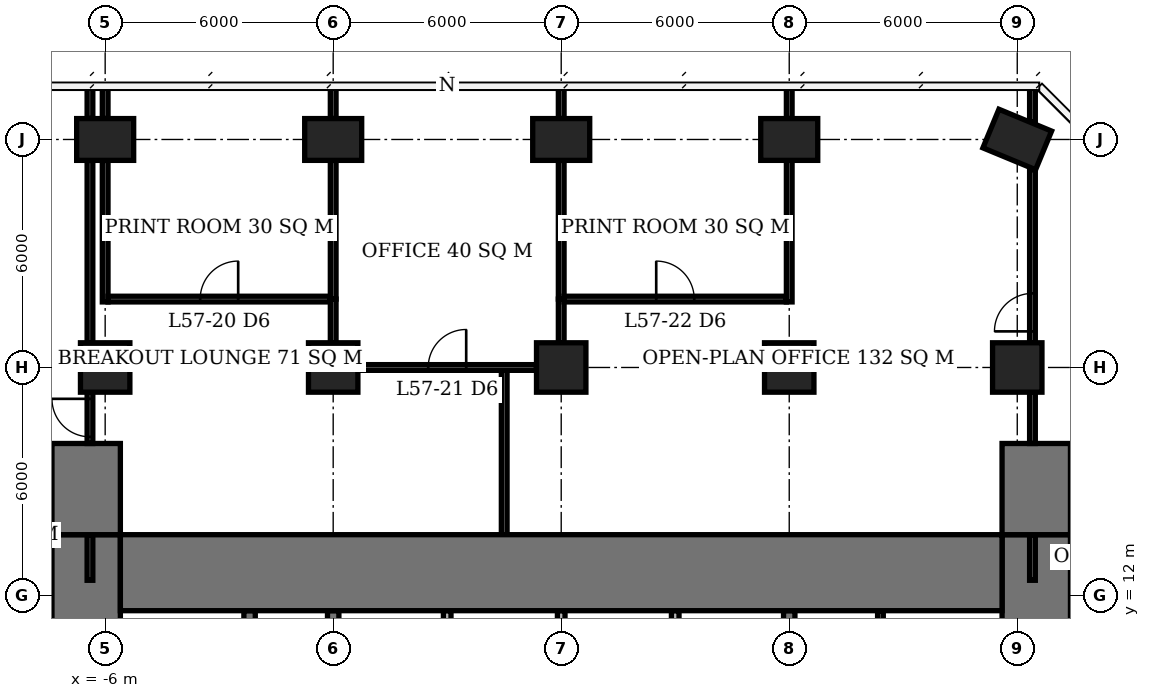
"""IFC4 building model, lengths in metres.
Left out: names, types, materials, properties, quantities, classifications, styles, units other than length and angle.
Written with IfcOpenShell. Run it as: python <this file> out.ifc"""

import sys

from ifc_helpers import new_model, si_unit, direction, frame, frame_2d, origin, origin_2d, place, context, subcontext, project, spatial, rectangle, extrude, element, fill, save


model = new_model("IFC4")
c1 = context("Model", 3, precision=1e-05, world=origin(), true_north=direction((0.0, 1.0)))
c2 = subcontext(c1, "Body", "Model", "MODEL_VIEW")
j1 = project(units=[si_unit("LENGTHUNIT", "METRE"), si_unit("PLANEANGLEUNIT", "RADIAN")], contexts=[c1])
p1 = place(None, origin())
s1 = spatial("IfcSite", under=j1, at=p1, CompositionType="ELEMENT")
p2 = place(p1, origin())
s2 = spatial("IfcBuilding", under=s1, at=p2, CompositionType="ELEMENT")
p3 = place(p2, frame((0.0, 0.0, 231.8)))
s3 = spatial("IfcBuildingStorey", under=s2, at=p3, CompositionType="ELEMENT", Elevation=231.8)
p4 = place(p3, frame((-6.0, 18.0, 0.0), z_axis=(0.0, 0.0, 1.0), x_axis=(1.0, 0.0, 0.0)))
e1 = element("IfcColumn", 1, at=p4, inside=s3, PredefinedType="COLUMN", context=c2, shape_type="SweptSolid", body=[
    extrude(rectangle(XDim=1.3, YDim=1.3, at=origin_2d()), origin(), (0.0, 0.0, 1.0), 3.9),
])
p5 = place(p3, frame((-6.0, 24.0, 0.0), z_axis=(0.0, 0.0, 1.0), x_axis=(1.0, 0.0, 0.0)))
e2 = element("IfcColumn", 2, at=p5, inside=s3, PredefinedType="COLUMN", context=c2, shape_type="SweptSolid", body=[
    extrude(rectangle(XDim=1.5, YDim=1.1, at=origin_2d()), origin(), (0.0, 0.0, 1.0), 3.9),
])
p6 = place(p3, frame((0.0, 18.0, 0.0), z_axis=(0.0, 0.0, 1.0), x_axis=(1.0, 0.0, 0.0)))
e3 = element("IfcColumn", 3, at=p6, inside=s3, PredefinedType="COLUMN", context=c2, shape_type="SweptSolid", body=[
    extrude(rectangle(XDim=1.3, YDim=1.3, at=origin_2d()), origin(), (0.0, 0.0, 1.0), 3.9),
])
p7 = place(p3, frame((0.0, 24.0, 0.0), z_axis=(0.0, 0.0, 1.0), x_axis=(1.0, 0.0, 0.0)))
e4 = element("IfcColumn", 4, at=p7, inside=s3, PredefinedType="COLUMN", context=c2, shape_type="SweptSolid", body=[
    extrude(rectangle(XDim=1.5, YDim=1.1, at=origin_2d()), origin(), (0.0, 0.0, 1.0), 3.9),
])
p8 = place(p3, frame((6.0, 18.0, 0.0), z_axis=(0.0, 0.0, 1.0), x_axis=(1.0, 0.0, 0.0)))
e5 = element("IfcColumn", 5, at=p8, inside=s3, PredefinedType="COLUMN", context=c2, shape_type="SweptSolid", body=[
    extrude(rectangle(XDim=1.3, YDim=1.3, at=origin_2d()), origin(), (0.0, 0.0, 1.0), 3.9),
])
p9 = place(p3, frame((6.0, 24.0, 0.0), z_axis=(0.0, 0.0, 1.0), x_axis=(1.0, 0.0, 0.0)))
e6 = element("IfcColumn", 6, at=p9, inside=s3, PredefinedType="COLUMN", context=c2, shape_type="SweptSolid", body=[
    extrude(rectangle(XDim=1.5, YDim=1.1, at=origin_2d()), origin(), (0.0, 0.0, 1.0), 3.9),
])
p10 = place(p3, frame((12.0, 18.0, 0.0), z_axis=(0.0, 0.0, 1.0), x_axis=(1.0, 0.0, 0.0)))
e7 = element("IfcColumn", 7, at=p10, inside=s3, PredefinedType="COLUMN", context=c2, shape_type="SweptSolid", body=[
    extrude(rectangle(XDim=1.3, YDim=1.3, at=origin_2d()), origin(), (0.0, 0.0, 1.0), 3.9),
])
p11 = place(p3, frame((12.0, 24.0, 0.0), z_axis=(0.0, 0.0, 1.0), x_axis=(1.0, 0.0, 0.0)))
e8 = element("IfcColumn", 8, at=p11, inside=s3, PredefinedType="COLUMN", context=c2, shape_type="SweptSolid", body=[
    extrude(rectangle(XDim=1.5, YDim=1.1, at=origin_2d()), origin(), (0.0, 0.0, 1.0), 3.9),
])
p12 = place(p3, frame((18.0, 18.0, 0.0), z_axis=(0.0, 0.0, 1.0), x_axis=(1.0, 0.0, 0.0)))
e9 = element("IfcColumn", 9, at=p12, inside=s3, PredefinedType="COLUMN", context=c2, shape_type="SweptSolid", body=[
    extrude(rectangle(XDim=1.3, YDim=1.3, at=origin_2d()), origin(), (0.0, 0.0, 1.0), 3.9),
])
p13 = place(p3, frame((18.0, 24.0, 0.0), z_axis=(0.0, 0.0, 1.0), x_axis=(0.923879532511, -0.382683432365, 0.0)))
e10 = element("IfcColumn", 10, at=p13, inside=s3, PredefinedType="COLUMN", context=c2, shape_type="SweptSolid", body=[
    extrude(rectangle(XDim=1.5, YDim=1.1, at=origin_2d()), origin(), (0.0, 0.0, 1.0), 3.9),
])
p14 = place(p3, frame((-5.6, 12.6, 0.0), z_axis=(0.0, 0.0, 1.0), x_axis=(1.0, 0.0, 0.0)))
e11 = element("IfcWall", 11, at=p14, inside=s3, PredefinedType="SHEAR", context=c2, shape_type="SweptSolid", body=[
    extrude(rectangle(XDim=23.2, YDim=2.0, at=frame_2d((11.6, 0.0))), origin(), (0.0, 0.0, 1.0), 3.9),
])
p15 = place(p3, frame((-6.5, -7.6, 0.0), z_axis=(0.0, 0.0, 1.0), x_axis=(0.0, 1.0, 0.0)))
e12 = element("IfcWall", 12, at=p15, inside=s3, PredefinedType="SHEAR", context=c2, shape_type="SweptSolid", body=[
    extrude(rectangle(XDim=21.2, YDim=1.8, at=frame_2d((10.6, 0.0))), origin(), (0.0, 0.0, 1.0), 3.9),
])
p16 = place(p15, frame((7.8, 0.0, 0.0)))
e13 = element("IfcOpeningElement", 13, at=p16, cuts=e12, PredefinedType="OPENING", context=c2, shape_type="SweptSolid", body=[
    extrude(rectangle(XDim=1.8, YDim=2.4, at=frame_2d((0.9, 1.2))), frame((0.0, 0.91, 0.0), z_axis=(0.0, -1.0, 0.0), x_axis=(1.0, 0.0, 0.0)), (0.0, 0.0, 1.0), 1.82),
])
p17 = place(p3, frame((18.5, -7.6, 0.0), z_axis=(0.0, 0.0, 1.0), x_axis=(0.0, 1.0, 0.0)))
e14 = element("IfcWall", 14, at=p17, inside=s3, PredefinedType="SHEAR", context=c2, shape_type="SweptSolid", body=[
    extrude(rectangle(XDim=21.2, YDim=1.8, at=frame_2d((10.6, 0.0))), origin(), (0.0, 0.0, 1.0), 3.9),
])
p18 = place(p17, frame((9.2, 0.0, 0.0)))
e15 = element("IfcOpeningElement", 15, at=p18, cuts=e14, PredefinedType="OPENING", context=c2, shape_type="SweptSolid", body=[
    extrude(rectangle(XDim=1.8, YDim=2.4, at=frame_2d((0.9, 1.2))), frame((0.0, 0.91, 0.0), z_axis=(0.0, -1.0, 0.0), x_axis=(1.0, 0.0, 0.0)), (0.0, 0.0, 1.0), 1.82),
])
for number, where, z_axis, x_axis in (
    (16, (-6.5, 13.6, 0.0), (0.0, 0.0, 1.0), (0.0, 1.0, 0.0)),
    (17, (18.5, 13.6, 0.0), (0.0, 0.0, 1.0), (0.0, 1.0, 0.0)),
):
    element("IfcWall", number, at=place(p3, frame(where, z_axis=z_axis, x_axis=x_axis)), inside=s3, PredefinedType="SHEAR", context=c2, shape_type="SweptSolid", body=[
        extrude(rectangle(XDim=2.4, YDim=1.8, at=frame_2d((1.2, 0.0))), origin(), (0.0, 0.0, 1.0), 3.9),
    ])
p19 = place(p3, frame((0.0, 3.15, 0.0), z_axis=(0.0, 0.0, 1.0), x_axis=(0.0, 1.0, 0.0)))
e18 = element("IfcWall", 18, at=p19, inside=s3, PredefinedType="SHEAR", context=c2, shape_type="SweptSolid", body=[
    extrude(rectangle(XDim=8.45, YDim=0.3, at=frame_2d((4.225, 0.0))), origin(), (0.0, 0.0, 1.0), 3.9),
])
p20 = place(p3, frame((12.0, 6.15, 0.0), z_axis=(0.0, 0.0, 1.0), x_axis=(0.0, 1.0, 0.0)))
e19 = element("IfcWall", 19, at=p20, inside=s3, PredefinedType="SHEAR", context=c2, shape_type="SweptSolid", body=[
    extrude(rectangle(XDim=5.45, YDim=0.3, at=frame_2d((2.725, 0.0))), origin(), (0.0, 0.0, 1.0), 3.9),
])
p21 = place(p3, frame((-2.2, 3.15, 0.0), z_axis=(0.0, 0.0, 1.0), x_axis=(0.0, 1.0, 0.0)))
e20 = element("IfcWall", 20, at=p21, inside=s3, PredefinedType="SHEAR", context=c2, shape_type="SweptSolid", body=[
    extrude(rectangle(XDim=8.45, YDim=0.3, at=frame_2d((4.225, 0.0))), origin(), (0.0, 0.0, 1.0), 3.9),
])
for number, where, z_axis, x_axis in (
    (21, (3.0, 6.15, 0.0), (0.0, 0.0, 1.0), (0.0, 1.0, 0.0)),
    (22, (6.0, 6.15, 0.0), (0.0, 0.0, 1.0), (0.0, 1.0, 0.0)),
    (23, (9.0, 6.15, 0.0), (0.0, 0.0, 1.0), (0.0, 1.0, 0.0)),
):
    element("IfcWall", number, at=place(p3, frame(where, z_axis=z_axis, x_axis=x_axis)), inside=s3, PredefinedType="SOLIDWALL", context=c2, shape_type="SweptSolid", body=[
        extrude(rectangle(XDim=5.45, YDim=0.2, at=frame_2d((2.725, 0.0))), origin(), (0.0, 0.0, 1.0), 3.9),
    ])
p22 = place(p3, frame((14.4, 6.15, 0.0), z_axis=(0.0, 0.0, 1.0), x_axis=(0.0, 1.0, 0.0)))
e24 = element("IfcWall", 24, at=p22, inside=s3, PredefinedType="PLUMBINGWALL", context=c2, shape_type="SweptSolid", body=[
    extrude(rectangle(XDim=5.45, YDim=0.15, at=frame_2d((2.725, 0.0))), origin(), (0.0, 0.0, 1.0), 3.65),
])
p23 = place(p3, frame((0.65, 18.0, 0.0), z_axis=(0.0, 0.0, 1.0), x_axis=(1.0, 0.0, 0.0)))
e25 = element("IfcWall", 25, at=p23, inside=s3, PredefinedType="PARTITIONING", context=c2, shape_type="SweptSolid", body=[
    extrude(rectangle(XDim=4.7, YDim=0.15, at=frame_2d((2.35, 0.0))), origin(), (0.0, 0.0, 1.0), 3.65),
])
p24 = place(p23, frame((1.85, 0.0, 0.0)))
e26 = element("IfcOpeningElement", 26, at=p24, cuts=e25, PredefinedType="OPENING", context=c2, shape_type="SweptSolid", body=[
    extrude(rectangle(XDim=1.0, YDim=2.1, at=frame_2d((0.5, 1.05))), frame((0.0, 0.085, 0.0), z_axis=(0.0, -1.0, 0.0), x_axis=(1.0, 0.0, 0.0)), (0.0, 0.0, 1.0), 0.17),
])
p25 = place(p3, frame((-5.925, 19.8, 0.0), z_axis=(0.0, 0.0, 1.0), x_axis=(1.0, 0.0, 0.0)))
e27 = element("IfcWall", 27, at=p25, inside=s3, PredefinedType="PARTITIONING", context=c2, shape_type="SweptSolid", body=[
    extrude(rectangle(XDim=5.85, YDim=0.15, at=frame_2d((2.925, 0.0))), origin(), (0.0, 0.0, 1.0), 3.65),
])
p26 = place(p25, frame((2.425, 0.0, 0.0)))
e28 = element("IfcOpeningElement", 28, at=p26, cuts=e27, PredefinedType="OPENING", context=c2, shape_type="SweptSolid", body=[
    extrude(rectangle(XDim=1.0, YDim=2.1, at=frame_2d((0.5, 1.05))), frame((0.0, 0.085, 0.0), z_axis=(0.0, -1.0, 0.0), x_axis=(1.0, 0.0, 0.0)), (0.0, 0.0, 1.0), 0.17),
])
p27 = place(p3, frame((6.075, 19.8, 0.0), z_axis=(0.0, 0.0, 1.0), x_axis=(1.0, 0.0, 0.0)))
e29 = element("IfcWall", 29, at=p27, inside=s3, PredefinedType="PARTITIONING", context=c2, shape_type="SweptSolid", body=[
    extrude(rectangle(XDim=5.85, YDim=0.15, at=frame_2d((2.925, 0.0))), origin(), (0.0, 0.0, 1.0), 3.65),
])
p28 = place(p27, frame((2.425, 0.0, 0.0)))
e30 = element("IfcOpeningElement", 30, at=p28, cuts=e29, PredefinedType="OPENING", context=c2, shape_type="SweptSolid", body=[
    extrude(rectangle(XDim=1.0, YDim=2.1, at=frame_2d((0.5, 1.05))), frame((0.0, 0.085, 0.0), z_axis=(0.0, -1.0, 0.0), x_axis=(1.0, 0.0, 0.0)), (0.0, 0.0, 1.0), 0.17),
])
p29 = place(p3, frame((-6.0, 19.725, 0.0), z_axis=(0.0, 0.0, 1.0), x_axis=(0.0, 1.0, 0.0)))
e31 = element("IfcWall", 31, at=p29, inside=s3, PredefinedType="PARTITIONING", context=c2, shape_type="SweptSolid", body=[
    extrude(rectangle(XDim=3.725, YDim=0.15, at=frame_2d((1.862, 0.0))), origin(), (0.0, 0.0, 1.0), 3.65),
])
p30 = place(p3, frame((-6.0, 24.55, 0.0), z_axis=(0.0, 0.0, 1.0), x_axis=(0.0, 1.0, 0.0)))
e32 = element("IfcWall", 32, at=p30, inside=s3, PredefinedType="PARTITIONING", context=c2, shape_type="SweptSolid", body=[
    extrude(rectangle(XDim=0.85, YDim=0.15, at=frame_2d((0.425, 0.0))), origin(), (0.0, 0.0, 1.0), 3.65),
])
p31 = place(p3, frame((0.0, 18.65, 0.0), z_axis=(0.0, 0.0, 1.0), x_axis=(0.0, 1.0, 0.0)))
e33 = element("IfcWall", 33, at=p31, inside=s3, PredefinedType="PARTITIONING", context=c2, shape_type="SweptSolid", body=[
    extrude(rectangle(XDim=1.15, YDim=0.15, at=frame_2d((0.575, 0.0))), origin(), (0.0, 0.0, 1.0), 3.65),
])
p32 = place(p3, frame((0.0, 19.8, 0.0), z_axis=(0.0, 0.0, 1.0), x_axis=(0.0, 1.0, 0.0)))
e34 = element("IfcWall", 34, at=p32, inside=s3, PredefinedType="PARTITIONING", context=c2, shape_type="SweptSolid", body=[
    extrude(rectangle(XDim=3.65, YDim=0.15, at=frame_2d((1.825, 0.0))), origin(), (0.0, 0.0, 1.0), 3.65),
])
p33 = place(p3, frame((0.0, 24.55, 0.0), z_axis=(0.0, 0.0, 1.0), x_axis=(0.0, 1.0, 0.0)))
e35 = element("IfcWall", 35, at=p33, inside=s3, PredefinedType="PARTITIONING", context=c2, shape_type="SweptSolid", body=[
    extrude(rectangle(XDim=0.8, YDim=0.15, at=frame_2d((0.4, 0.0))), origin(), (0.0, 0.0, 1.0), 3.65),
])
p34 = place(p3, frame((6.0, 18.65, 0.0), z_axis=(0.0, 0.0, 1.0), x_axis=(0.0, 1.0, 0.0)))
e36 = element("IfcWall", 36, at=p34, inside=s3, PredefinedType="PARTITIONING", context=c2, shape_type="SweptSolid", body=[
    extrude(rectangle(XDim=1.15, YDim=0.15, at=frame_2d((0.575, 0.0))), origin(), (0.0, 0.0, 1.0), 3.65),
])
p35 = place(p3, frame((6.0, 19.8, 0.0), z_axis=(0.0, 0.0, 1.0), x_axis=(0.0, 1.0, 0.0)))
e37 = element("IfcWall", 37, at=p35, inside=s3, PredefinedType="PARTITIONING", context=c2, shape_type="SweptSolid", body=[
    extrude(rectangle(XDim=3.65, YDim=0.15, at=frame_2d((1.825, 0.0))), origin(), (0.0, 0.0, 1.0), 3.65),
])
p36 = place(p3, frame((6.0, 24.55, 0.0), z_axis=(0.0, 0.0, 1.0), x_axis=(0.0, 1.0, 0.0)))
e38 = element("IfcWall", 38, at=p36, inside=s3, PredefinedType="PARTITIONING", context=c2, shape_type="SweptSolid", body=[
    extrude(rectangle(XDim=0.8, YDim=0.15, at=frame_2d((0.4, 0.0))), origin(), (0.0, 0.0, 1.0), 3.65),
])
p37 = place(p3, frame((12.0, 19.725, 0.0), z_axis=(0.0, 0.0, 1.0), x_axis=(0.0, 1.0, 0.0)))
e39 = element("IfcWall", 39, at=p37, inside=s3, PredefinedType="PARTITIONING", context=c2, shape_type="SweptSolid", body=[
    extrude(rectangle(XDim=3.725, YDim=0.15, at=frame_2d((1.862, 0.0))), origin(), (0.0, 0.0, 1.0), 3.65),
])
p38 = place(p3, frame((12.0, 24.55, 0.0), z_axis=(0.0, 0.0, 1.0), x_axis=(0.0, 1.0, 0.0)))
e40 = element("IfcWall", 40, at=p38, inside=s3, PredefinedType="PARTITIONING", context=c2, shape_type="SweptSolid", body=[
    extrude(rectangle(XDim=0.85, YDim=0.15, at=frame_2d((0.425, 0.0))), origin(), (0.0, 0.0, 1.0), 3.65),
])
p39 = place(p3, frame((-6.4, 12.4, 0.0), z_axis=(0.0, 0.0, 1.0), x_axis=(0.0, 1.0, 0.0)))
e41 = element("IfcWall", 41, at=p39, inside=s3, PredefinedType="PARTITIONING", context=c2, shape_type="SweptSolid", body=[
    extrude(rectangle(XDim=1.2, YDim=0.15, at=frame_2d((0.6, 0.0))), origin(), (0.0, 0.0, 1.0), 3.65),
])
p40 = place(p3, frame((-6.4, 16.0, 0.0), z_axis=(0.0, 0.0, 1.0), x_axis=(0.0, 1.0, 0.0)))
e42 = element("IfcWall", 42, at=p40, inside=s3, PredefinedType="PARTITIONING", context=c2, shape_type="SweptSolid", body=[
    extrude(rectangle(XDim=1.35, YDim=0.15, at=frame_2d((0.675, 0.0))), origin(), (0.0, 0.0, 1.0), 3.65),
])
p41 = place(p40, frame((0.175, 0.0, 0.0)))
e43 = element("IfcOpeningElement", 43, at=p41, cuts=e42, PredefinedType="OPENING", context=c2, shape_type="SweptSolid", body=[
    extrude(rectangle(XDim=1.0, YDim=2.1, at=frame_2d((0.5, 1.05))), frame((0.0, 0.085, 0.0), z_axis=(0.0, -1.0, 0.0), x_axis=(1.0, 0.0, 0.0)), (0.0, 0.0, 1.0), 0.17),
])
p42 = place(p3, frame((-6.4, 18.65, 0.0), z_axis=(0.0, 0.0, 1.0), x_axis=(0.0, 1.0, 0.0)))
e44 = element("IfcWall", 44, at=p42, inside=s3, PredefinedType="PARTITIONING", context=c2, shape_type="SweptSolid", body=[
    extrude(rectangle(XDim=4.8, YDim=0.15, at=frame_2d((2.4, 0.0))), origin(), (0.0, 0.0, 1.0), 3.65),
])
p43 = place(p3, frame((-6.4, 24.55, 0.0), z_axis=(0.0, 0.0, 1.0), x_axis=(0.0, 1.0, 0.0)))
e45 = element("IfcWall", 45, at=p43, inside=s3, PredefinedType="PARTITIONING", context=c2, shape_type="SweptSolid", body=[
    extrude(rectangle(XDim=0.8, YDim=0.15, at=frame_2d((0.4, 0.0))), origin(), (0.0, 0.0, 1.0), 3.65),
])
p44 = place(p3, frame((4.5, 12.4, 0.0), z_axis=(0.0, 0.0, 1.0), x_axis=(0.0, 1.0, 0.0)))
e46 = element("IfcWall", 46, at=p44, inside=s3, PredefinedType="PARTITIONING", context=c2, shape_type="SweptSolid", body=[
    extrude(rectangle(XDim=5.525, YDim=0.15, at=frame_2d((2.763, 0.0))), origin(), (0.0, 0.0, 1.0), 3.65),
])
p45 = place(p3, frame((18.4, 12.4, 0.0), z_axis=(0.0, 0.0, 1.0), x_axis=(0.0, 1.0, 0.0)))
e47 = element("IfcWall", 47, at=p45, inside=s3, PredefinedType="PARTITIONING", context=c2, shape_type="SweptSolid", body=[
    extrude(rectangle(XDim=1.2, YDim=0.15, at=frame_2d((0.6, 0.0))), origin(), (0.0, 0.0, 1.0), 3.65),
])
p46 = place(p3, frame((18.4, 16.0, 0.0), z_axis=(0.0, 0.0, 1.0), x_axis=(0.0, 1.0, 0.0)))
e48 = element("IfcWall", 48, at=p46, inside=s3, PredefinedType="PARTITIONING", context=c2, shape_type="SweptSolid", body=[
    extrude(rectangle(XDim=1.35, YDim=0.15, at=frame_2d((0.675, 0.0))), origin(), (0.0, 0.0, 1.0), 3.65),
])
p47 = place(p3, frame((18.4, 18.65, 0.0), z_axis=(0.0, 0.0, 1.0), x_axis=(0.0, 1.0, 0.0)))
e49 = element("IfcWall", 49, at=p47, inside=s3, PredefinedType="PARTITIONING", context=c2, shape_type="SweptSolid", body=[
    extrude(rectangle(XDim=4.558, YDim=0.15, at=frame_2d((2.279, 0.0))), origin(), (0.0, 0.0, 1.0), 3.65),
])
p48 = place(p47, frame((0.3, 0.0, 0.0)))
e50 = element("IfcOpeningElement", 50, at=p48, cuts=e49, PredefinedType="OPENING", context=c2, shape_type="SweptSolid", body=[
    extrude(rectangle(XDim=1.0, YDim=2.1, at=frame_2d((0.5, 1.05))), frame((0.0, 0.085, 0.0), z_axis=(0.0, -1.0, 0.0), x_axis=(1.0, 0.0, 0.0)), (0.0, 0.0, 1.0), 0.17),
])
p49 = place(p3, frame((18.4, 24.461, 0.0), z_axis=(0.0, 0.0, 1.0), x_axis=(0.0, 1.0, 0.0)))
e51 = element("IfcWall", 51, at=p49, inside=s3, PredefinedType="PARTITIONING", context=c2, shape_type="SweptSolid", body=[
    extrude(rectangle(XDim=0.939, YDim=0.15, at=frame_2d((0.47, 0.0))), origin(), (0.0, 0.0, 1.0), 3.65),
])
p50 = place(p26, origin())
e52 = element("IfcDoor", 52, at=p50, inside=s3, OperationType="SINGLE_SWING_RIGHT", PredefinedType="DOOR", context=c2, shape_type="SweptSolid", body=[
    extrude(rectangle(XDim=1.0, YDim=2.1, at=frame_2d((0.5, 1.05))), frame((0.0, 0.025, 0.0), z_axis=(0.0, -1.0, 0.0), x_axis=(1.0, 0.0, 0.0)), (0.0, 0.0, 1.0), 0.05),
])
fill(e28, e52)
p51 = place(p24, origin())
e53 = element("IfcDoor", 53, at=p51, inside=s3, OperationType="SINGLE_SWING_RIGHT", PredefinedType="DOOR", context=c2, shape_type="SweptSolid", body=[
    extrude(rectangle(XDim=1.0, YDim=2.1, at=frame_2d((0.5, 1.05))), frame((0.0, 0.025, 0.0), z_axis=(0.0, -1.0, 0.0), x_axis=(1.0, 0.0, 0.0)), (0.0, 0.0, 1.0), 0.05),
])
fill(e26, e53)
p52 = place(p28, origin())
e54 = element("IfcDoor", 54, at=p52, inside=s3, OperationType="SINGLE_SWING_LEFT", PredefinedType="DOOR", context=c2, shape_type="SweptSolid", body=[
    extrude(rectangle(XDim=1.0, YDim=2.1, at=frame_2d((0.5, 1.05))), frame((0.0, 0.025, 0.0), z_axis=(0.0, -1.0, 0.0), x_axis=(1.0, 0.0, 0.0)), (0.0, 0.0, 1.0), 0.05),
])
fill(e30, e54)
p53 = place(p48, origin())
e55 = element("IfcDoor", 55, at=p53, inside=s3, OperationType="SINGLE_SWING_LEFT", PredefinedType="DOOR", context=c2, shape_type="SweptSolid", body=[
    extrude(rectangle(XDim=1.0, YDim=2.1, at=frame_2d((0.5, 1.05))), frame((0.0, 0.025, 0.0), z_axis=(0.0, -1.0, 0.0), x_axis=(1.0, 0.0, 0.0)), (0.0, 0.0, 1.0), 0.05),
])
fill(e50, e55)
p54 = place(p41, origin())
e56 = element("IfcDoor", 56, at=p54, inside=s3, OperationType="SINGLE_SWING_RIGHT", PredefinedType="DOOR", context=c2, shape_type="SweptSolid", body=[
    extrude(rectangle(XDim=1.0, YDim=2.1, at=frame_2d((0.5, 1.05))), frame((0.0, 0.025, 0.0), z_axis=(0.0, -1.0, 0.0), x_axis=(1.0, 0.0, 0.0)), (0.0, 0.0, 1.0), 0.05),
])
fill(e43, e56)
save(model, sys.argv[1])
